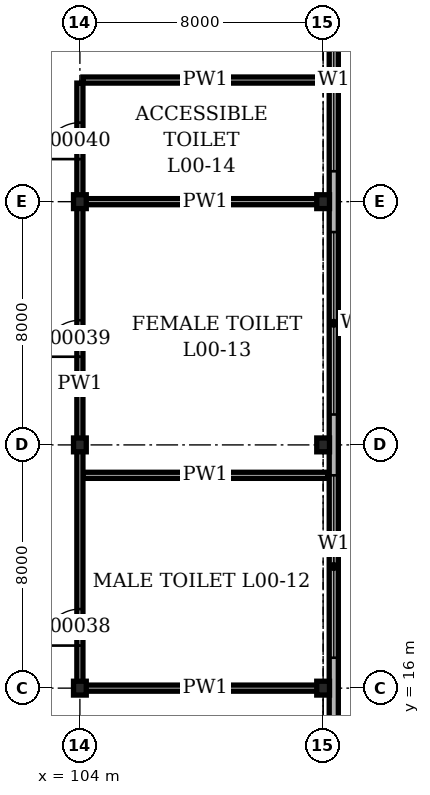
"""IFC4 building model, lengths in metres.
Left out: names, types, materials, properties, quantities, classifications, styles, units other than length and angle.
Written with IfcOpenShell. Run it as: python <this file> out.ifc"""

import sys

from ifc_helpers import new_model, si_unit, direction, frame, frame_2d, origin, origin_2d, place, context, subcontext, project, spatial, rectangle, i_section, extrude, element, fill, save


model = new_model("IFC4")
c1 = context("Model", 3, precision=1e-05, world=origin(), true_north=direction((0.0, 1.0)))
c2 = subcontext(c1, "Body", "Model", "MODEL_VIEW")
j1 = project(units=[si_unit("LENGTHUNIT", "METRE"), si_unit("PLANEANGLEUNIT", "RADIAN")], contexts=[c1])
p1 = place(None, origin())
s1 = spatial("IfcSite", under=j1, at=p1, CompositionType="ELEMENT")
p2 = place(p1, origin())
s2 = spatial("IfcBuilding", under=s1, at=p2, CompositionType="ELEMENT")
p3 = place(p2, origin())
s3 = spatial("IfcBuildingStorey", under=s2, at=p3, CompositionType="ELEMENT", Elevation=0.0)
for number, where, z_axis, x_axis in (
    (1, (104.0, 16.0, 0.0), (0.0, 0.0, 1.0), (1.0, 0.0, 0.0)),
    (2, (104.0, 24.0, 0.0), (0.0, 0.0, 1.0), (1.0, 0.0, 0.0)),
    (3, (104.0, 32.0, 0.0), (0.0, 0.0, 1.0), (1.0, 0.0, 0.0)),
    (4, (112.0, 16.0, 0.0), (0.0, 0.0, 1.0), (1.0, 0.0, 0.0)),
    (5, (112.0, 24.0, 0.0), (0.0, 0.0, 1.0), (1.0, 0.0, 0.0)),
    (6, (112.0, 32.0, 0.0), (0.0, 0.0, 1.0), (1.0, 0.0, 0.0)),
):
    element("IfcColumn", number, at=place(p3, frame(where, z_axis=z_axis, x_axis=x_axis)), inside=s3, PredefinedType="COLUMN", context=c2, shape_type="SweptSolid", body=[
        extrude(i_section(OverallWidth=0.419, OverallDepth=0.455, WebThickness=0.042, FlangeThickness=0.068, at=origin_2d()), origin(), (0.0, 0.0, 1.0), 4.9),
    ])
p4 = place(p3, frame((112.35, -0.35, 0.0), z_axis=(0.0, 0.0, 1.0), x_axis=(0.0, 1.0, 0.0)))
e7 = element("IfcWall", 7, at=p4, inside=s3, PredefinedType="SOLIDWALL", context=c2, shape_type="SweptSolid", body=[
    extrude(rectangle(XDim=112.7, YDim=0.3, at=frame_2d((56.35, 0.0))), origin(), (0.0, 0.0, 1.0), 4.9),
])
p5 = place(p4, frame((3.45, 0.0, 0.0)))
e8 = element("IfcOpeningElement", 8, at=p5, cuts=e7, PredefinedType="OPENING", context=c2, shape_type="SweptSolid", body=[
    extrude(rectangle(XDim=1.8, YDim=2.4, at=frame_2d((0.9, 1.2))), frame((0.0, 0.16, 0.0), z_axis=(0.0, -1.0, 0.0), x_axis=(1.0, 0.0, 0.0)), (0.0, 0.0, 1.0), 0.32),
])
p6 = place(p4, frame((11.45, 0.0, 0.0)))
e9 = element("IfcOpeningElement", 9, at=p6, cuts=e7, PredefinedType="OPENING", context=c2, shape_type="SweptSolid", body=[
    extrude(rectangle(XDim=1.8, YDim=2.4, at=frame_2d((0.9, 1.2))), frame((0.0, 0.16, 0.0), z_axis=(0.0, -1.0, 0.0), x_axis=(1.0, 0.0, 0.0)), (0.0, 0.0, 1.0), 0.32),
])
p7 = place(p4, frame((17.35, 0.0, 1.2)))
e10 = element("IfcOpeningElement", 10, at=p7, cuts=e7, PredefinedType="OPENING", context=c2, shape_type="SweptSolid", body=[
    extrude(rectangle(XDim=6.0, YDim=1.5, at=frame_2d((3.0, 0.75))), frame((0.0, 0.16, 0.0), z_axis=(0.0, -1.0, 0.0), x_axis=(1.0, 0.0, 0.0)), (0.0, 0.0, 1.0), 0.32),
])
p8 = place(p4, frame((25.35, 0.0, 1.2)))
e11 = element("IfcOpeningElement", 11, at=p8, cuts=e7, PredefinedType="OPENING", context=c2, shape_type="SweptSolid", body=[
    extrude(rectangle(XDim=6.0, YDim=1.5, at=frame_2d((3.0, 0.75))), frame((0.0, 0.16, 0.0), z_axis=(0.0, -1.0, 0.0), x_axis=(1.0, 0.0, 0.0)), (0.0, 0.0, 1.0), 0.32),
])
p9 = place(p4, frame((33.35, 0.0, 1.2)))
e12 = element("IfcOpeningElement", 12, at=p9, cuts=e7, PredefinedType="OPENING", context=c2, shape_type="SweptSolid", body=[
    extrude(rectangle(XDim=6.0, YDim=1.5, at=frame_2d((3.0, 0.75))), frame((0.0, 0.16, 0.0), z_axis=(0.0, -1.0, 0.0), x_axis=(1.0, 0.0, 0.0)), (0.0, 0.0, 1.0), 0.32),
])
p10 = place(p4, frame((41.35, 0.0, 1.2)))
e13 = element("IfcOpeningElement", 13, at=p10, cuts=e7, PredefinedType="OPENING", context=c2, shape_type="SweptSolid", body=[
    extrude(rectangle(XDim=6.0, YDim=1.5, at=frame_2d((3.0, 0.75))), frame((0.0, 0.16, 0.0), z_axis=(0.0, -1.0, 0.0), x_axis=(1.0, 0.0, 0.0)), (0.0, 0.0, 1.0), 0.32),
])
p11 = place(p4, frame((49.45, 0.0, 0.0)))
e14 = element("IfcOpeningElement", 14, at=p11, cuts=e7, PredefinedType="OPENING", context=c2, shape_type="SweptSolid", body=[
    extrude(rectangle(XDim=1.8, YDim=2.4, at=frame_2d((0.9, 1.2))), frame((0.0, 0.16, 0.0), z_axis=(0.0, -1.0, 0.0), x_axis=(1.0, 0.0, 0.0)), (0.0, 0.0, 1.0), 0.32),
])
p12 = place(p4, frame((53.45, 0.0, 0.0)))
e15 = element("IfcOpeningElement", 15, at=p12, cuts=e7, PredefinedType="OPENING", context=c2, shape_type="SweptSolid", body=[
    extrude(rectangle(XDim=1.8, YDim=2.4, at=frame_2d((0.9, 1.2))), frame((0.0, 0.16, 0.0), z_axis=(0.0, -1.0, 0.0), x_axis=(1.0, 0.0, 0.0)), (0.0, 0.0, 1.0), 0.32),
])
p13 = place(p4, frame((57.35, 0.0, 1.2)))
e16 = element("IfcOpeningElement", 16, at=p13, cuts=e7, PredefinedType="OPENING", context=c2, shape_type="SweptSolid", body=[
    extrude(rectangle(XDim=6.0, YDim=1.5, at=frame_2d((3.0, 0.75))), frame((0.0, 0.16, 0.0), z_axis=(0.0, -1.0, 0.0), x_axis=(1.0, 0.0, 0.0)), (0.0, 0.0, 1.0), 0.32),
])
p14 = place(p4, frame((65.15, 0.0, 0.0)))
e17 = element("IfcOpeningElement", 17, at=p14, cuts=e7, PredefinedType="OPENING", context=c2, shape_type="SweptSolid", body=[
    extrude(rectangle(XDim=2.4, YDim=3.0, at=frame_2d((1.2, 1.5))), frame((0.0, 0.16, 0.0), z_axis=(0.0, -1.0, 0.0), x_axis=(1.0, 0.0, 0.0)), (0.0, 0.0, 1.0), 0.32),
])
p15 = place(p4, frame((69.15, 0.0, 0.0)))
e18 = element("IfcOpeningElement", 18, at=p15, cuts=e7, PredefinedType="OPENING", context=c2, shape_type="SweptSolid", body=[
    extrude(rectangle(XDim=2.4, YDim=3.0, at=frame_2d((1.2, 1.5))), frame((0.0, 0.16, 0.0), z_axis=(0.0, -1.0, 0.0), x_axis=(1.0, 0.0, 0.0)), (0.0, 0.0, 1.0), 0.32),
])
p16 = place(p4, frame((74.05, 0.0, 0.0)))
e19 = element("IfcOpeningElement", 19, at=p16, cuts=e7, PredefinedType="OPENING", context=c2, shape_type="SweptSolid", body=[
    extrude(rectangle(XDim=1.8, YDim=2.4, at=frame_2d((0.9, 1.2))), frame((0.0, 0.16, 0.0), z_axis=(0.0, -1.0, 0.0), x_axis=(1.0, 0.0, 0.0)), (0.0, 0.0, 1.0), 0.32),
])
p17 = place(p4, frame((81.35, 0.0, 1.2)))
e20 = element("IfcOpeningElement", 20, at=p17, cuts=e7, PredefinedType="OPENING", context=c2, shape_type="SweptSolid", body=[
    extrude(rectangle(XDim=6.0, YDim=1.5, at=frame_2d((3.0, 0.75))), frame((0.0, 0.16, 0.0), z_axis=(0.0, -1.0, 0.0), x_axis=(1.0, 0.0, 0.0)), (0.0, 0.0, 1.0), 0.32),
])
p18 = place(p4, frame((90.35, 0.0, 0.0)))
e21 = element("IfcOpeningElement", 21, at=p18, cuts=e7, PredefinedType="OPENING", context=c2, shape_type="SweptSolid", body=[
    extrude(rectangle(XDim=4.0, YDim=4.5, at=frame_2d((2.0, 2.25))), frame((0.0, 0.16, 0.0), z_axis=(0.0, -1.0, 0.0), x_axis=(1.0, 0.0, 0.0)), (0.0, 0.0, 1.0), 0.32),
])
p19 = place(p4, frame((98.35, 0.0, 0.0)))
e22 = element("IfcOpeningElement", 22, at=p19, cuts=e7, PredefinedType="OPENING", context=c2, shape_type="SweptSolid", body=[
    extrude(rectangle(XDim=4.0, YDim=4.5, at=frame_2d((2.0, 2.25))), frame((0.0, 0.16, 0.0), z_axis=(0.0, -1.0, 0.0), x_axis=(1.0, 0.0, 0.0)), (0.0, 0.0, 1.0), 0.32),
])
p20 = place(p4, frame((106.35, 0.0, 0.0)))
e23 = element("IfcOpeningElement", 23, at=p20, cuts=e7, PredefinedType="OPENING", context=c2, shape_type="SweptSolid", body=[
    extrude(rectangle(XDim=4.0, YDim=4.5, at=frame_2d((2.0, 2.25))), frame((0.0, 0.16, 0.0), z_axis=(0.0, -1.0, 0.0), x_axis=(1.0, 0.0, 0.0)), (0.0, 0.0, 1.0), 0.32),
])
p21 = place(p3, frame((104.1, 16.0, 0.0), z_axis=(0.0, 0.0, 1.0), x_axis=(1.0, 0.0, 0.0)))
e24 = element("IfcWall", 24, at=p21, inside=s3, PredefinedType="PARTITIONING", context=c2, shape_type="SweptSolid", body=[
    extrude(rectangle(XDim=8.05, YDim=0.2, at=frame_2d((4.025, 0.0))), origin(), (0.0, 0.0, 1.0), 3.928),
])
p22 = place(p3, frame((104.1, 23.0, 0.0), z_axis=(0.0, 0.0, 1.0), x_axis=(1.0, 0.0, 0.0)))
e25 = element("IfcWall", 25, at=p22, inside=s3, PredefinedType="PARTITIONING", context=c2, shape_type="SweptSolid", body=[
    extrude(rectangle(XDim=8.05, YDim=0.2, at=frame_2d((4.025, 0.0))), origin(), (0.0, 0.0, 1.0), 4.7),
])
p23 = place(p3, frame((104.1, 32.0, 0.0), z_axis=(0.0, 0.0, 1.0), x_axis=(1.0, 0.0, 0.0)))
e26 = element("IfcWall", 26, at=p23, inside=s3, PredefinedType="PARTITIONING", context=c2, shape_type="SweptSolid", body=[
    extrude(rectangle(XDim=8.05, YDim=0.2, at=frame_2d((4.025, 0.0))), origin(), (0.0, 0.0, 1.0), 3.928),
])
p24 = place(p3, frame((104.1, 36.0, 0.0), z_axis=(0.0, 0.0, 1.0), x_axis=(1.0, 0.0, 0.0)))
e27 = element("IfcWall", 27, at=p24, inside=s3, PredefinedType="PARTITIONING", context=c2, shape_type="SweptSolid", body=[
    extrude(rectangle(XDim=8.05, YDim=0.2, at=frame_2d((4.025, 0.0))), origin(), (0.0, 0.0, 1.0), 4.7),
])
p25 = place(p3, frame((104.0, 16.1, 0.0), z_axis=(0.0, 0.0, 1.0), x_axis=(0.0, 1.0, 0.0)))
e28 = element("IfcWall", 28, at=p25, inside=s3, PredefinedType="PARTITIONING", context=c2, shape_type="SweptSolid", body=[
    extrude(rectangle(XDim=19.8, YDim=0.2, at=frame_2d((9.9, 0.0))), origin(), (0.0, 0.0, 1.0), 3.928),
])
p26 = place(p25, frame((1.3, 0.0, 0.0)))
e29 = element("IfcOpeningElement", 29, at=p26, cuts=e28, PredefinedType="OPENING", context=c2, shape_type="SweptSolid", body=[
    extrude(rectangle(XDim=1.2, YDim=2.1, at=frame_2d((0.6, 1.05))), frame((0.0, 0.11, 0.0), z_axis=(0.0, -1.0, 0.0), x_axis=(1.0, 0.0, 0.0)), (0.0, 0.0, 1.0), 0.22),
])
p27 = place(p25, frame((10.8, 0.0, 0.0)))
e30 = element("IfcOpeningElement", 30, at=p27, cuts=e28, PredefinedType="OPENING", context=c2, shape_type="SweptSolid", body=[
    extrude(rectangle(XDim=1.2, YDim=2.1, at=frame_2d((0.6, 1.05))), frame((0.0, 0.11, 0.0), z_axis=(0.0, -1.0, 0.0), x_axis=(1.0, 0.0, 0.0)), (0.0, 0.0, 1.0), 0.22),
])
p28 = place(p25, frame((17.3, 0.0, 0.0)))
e31 = element("IfcOpeningElement", 31, at=p28, cuts=e28, PredefinedType="OPENING", context=c2, shape_type="SweptSolid", body=[
    extrude(rectangle(XDim=1.2, YDim=2.1, at=frame_2d((0.6, 1.05))), frame((0.0, 0.11, 0.0), z_axis=(0.0, -1.0, 0.0), x_axis=(1.0, 0.0, 0.0)), (0.0, 0.0, 1.0), 0.22),
])
p29 = place(p7, origin())
e32 = element("IfcWindow", 32, at=p29, inside=s3, PartitioningType="SINGLE_PANEL", PredefinedType="WINDOW", context=c2, shape_type="SweptSolid", body=[
    extrude(rectangle(XDim=6.0, YDim=1.5, at=frame_2d((3.0, 0.75))), frame((0.0, 0.03, 0.0), z_axis=(0.0, -1.0, 0.0), x_axis=(1.0, 0.0, 0.0)), (0.0, 0.0, 1.0), 0.06),
])
fill(e10, e32)
p30 = place(p8, origin())
e33 = element("IfcWindow", 33, at=p30, inside=s3, PartitioningType="SINGLE_PANEL", PredefinedType="WINDOW", context=c2, shape_type="SweptSolid", body=[
    extrude(rectangle(XDim=6.0, YDim=1.5, at=frame_2d((3.0, 0.75))), frame((0.0, 0.03, 0.0), z_axis=(0.0, -1.0, 0.0), x_axis=(1.0, 0.0, 0.0)), (0.0, 0.0, 1.0), 0.06),
])
fill(e11, e33)
p31 = place(p9, origin())
e34 = element("IfcWindow", 34, at=p31, inside=s3, PartitioningType="SINGLE_PANEL", PredefinedType="WINDOW", context=c2, shape_type="SweptSolid", body=[
    extrude(rectangle(XDim=6.0, YDim=1.5, at=frame_2d((3.0, 0.75))), frame((0.0, 0.03, 0.0), z_axis=(0.0, -1.0, 0.0), x_axis=(1.0, 0.0, 0.0)), (0.0, 0.0, 1.0), 0.06),
])
fill(e12, e34)
p32 = place(p26, origin())
e35 = element("IfcDoor", 35, at=p32, inside=s3, OperationType="SINGLE_SWING_RIGHT", PredefinedType="DOOR", context=c2, shape_type="SweptSolid", body=[
    extrude(rectangle(XDim=1.2, YDim=2.1, at=frame_2d((0.6, 1.05))), frame((0.0, 0.1, 0.0), z_axis=(0.0, -1.0, 0.0), x_axis=(1.0, 0.0, 0.0)), (0.0, 0.0, 1.0), 0.199),
])
fill(e29, e35)
p33 = place(p27, origin())
e36 = element("IfcDoor", 36, at=p33, inside=s3, OperationType="SINGLE_SWING_RIGHT", PredefinedType="DOOR", context=c2, shape_type="SweptSolid", body=[
    extrude(rectangle(XDim=1.2, YDim=2.1, at=frame_2d((0.6, 1.05))), frame((0.0, 0.1, 0.0), z_axis=(0.0, -1.0, 0.0), x_axis=(1.0, 0.0, 0.0)), (0.0, 0.0, 1.0), 0.199),
])
fill(e30, e36)
p34 = place(p28, origin())
e37 = element("IfcDoor", 37, at=p34, inside=s3, OperationType="SINGLE_SWING_RIGHT", PredefinedType="DOOR", context=c2, shape_type="SweptSolid", body=[
    extrude(rectangle(XDim=1.2, YDim=2.1, at=frame_2d((0.6, 1.05))), frame((0.0, 0.1, 0.0), z_axis=(0.0, -1.0, 0.0), x_axis=(1.0, 0.0, 0.0)), (0.0, 0.0, 1.0), 0.199),
])
fill(e31, e37)
save(model, sys.argv[1])
